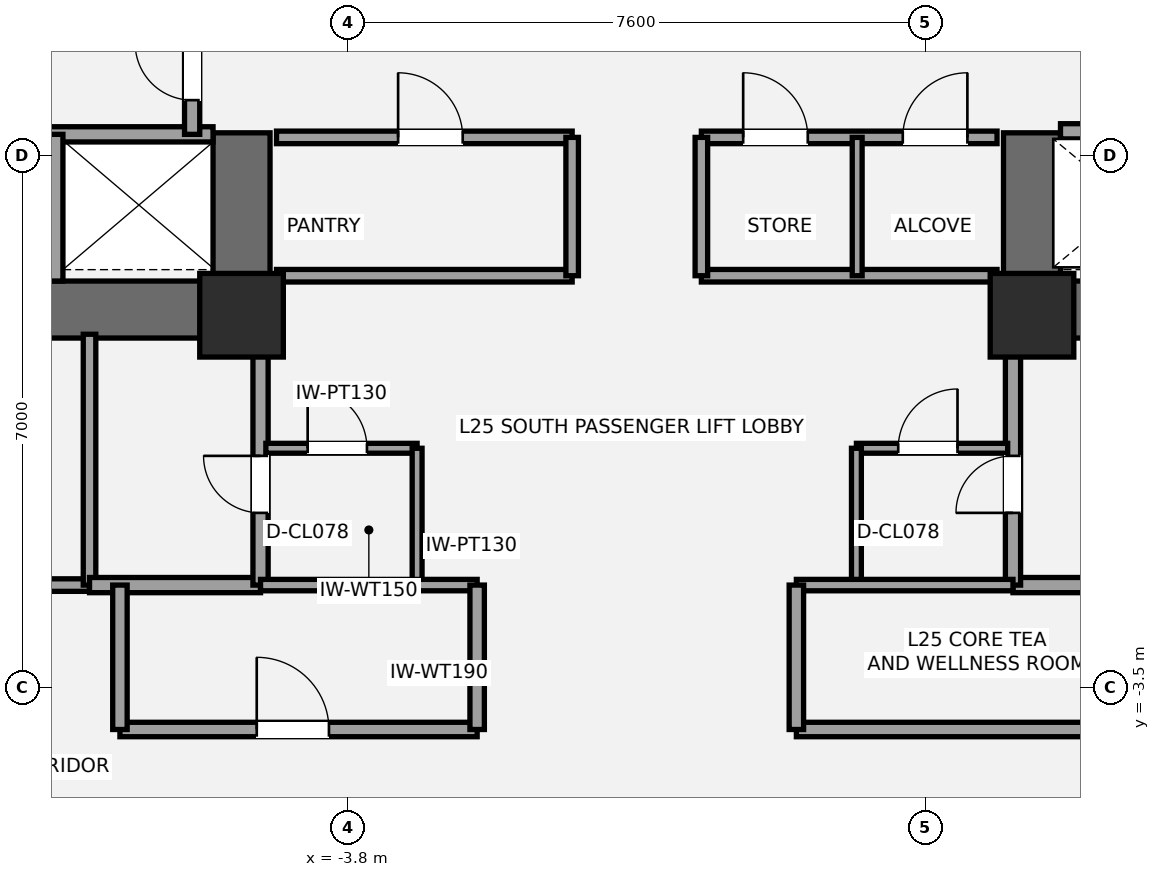
"""IFC4 building model, lengths in metres.
Left out: names, types, materials, properties, quantities, classifications, styles, units other than length and angle.
Written with IfcOpenShell. Run it as: python <this file> out.ifc"""

import sys

from ifc_helpers import new_model, si_unit, direction, frame, frame_2d, origin, origin_2d, place, context, subcontext, project, spatial, rectangle, extrude, element, fill, save


model = new_model("IFC4")
c1 = context("Model", 3, precision=1e-05, world=origin(), true_north=direction((0.0, 1.0)))
c2 = subcontext(c1, "Body", "Model", "MODEL_VIEW")
j1 = project(units=[si_unit("LENGTHUNIT", "METRE"), si_unit("PLANEANGLEUNIT", "RADIAN")], contexts=[c1])
p1 = place(None, origin())
s1 = spatial("IfcSite", under=j1, at=p1, CompositionType="ELEMENT")
p2 = place(p1, origin())
s2 = spatial("IfcBuilding", under=s1, at=p2, CompositionType="ELEMENT")
p3 = place(p2, frame((0.0, 0.0, 96.6)))
s3 = spatial("IfcBuildingStorey", under=s2, at=p3, CompositionType="ELEMENT", Elevation=96.6)
p4 = place(p3, frame((-4.825, 1.475, 0.0), z_axis=(0.0, 0.0, 1.0), x_axis=(-1.0, 0.0, 0.0)))
e1 = element("IfcWall", 1, at=p4, inside=s3, PredefinedType="SHEAR", context=c2, shape_type="SweptSolid", body=[
    extrude(rectangle(XDim=9.075, YDim=0.75, at=frame_2d((4.538, 0.0))), origin(), (0.0, 0.0, 1.0), 3.5),
])
p5 = place(p4, frame((5.475, 0.0, 0.0)))
e2 = element("IfcOpeningElement", 2, at=p5, cuts=e1, PredefinedType="OPENING", context=c2, shape_type="SweptSolid", body=[
    extrude(rectangle(XDim=1.05, YDim=2.15, at=frame_2d((0.525, 1.075))), frame((0.0, 0.385, 0.0), z_axis=(0.0, -1.0, 0.0), x_axis=(1.0, 0.0, 0.0)), (0.0, 0.0, 1.0), 0.77),
])
p6 = place(p4, frame((3.805, 0.0, 0.0)))
e3 = element("IfcOpeningElement", 3, at=p6, cuts=e1, PredefinedType="OPENING", context=c2, shape_type="SweptSolid", body=[
    extrude(rectangle(XDim=1.1, YDim=2.2, at=frame_2d((0.55, 1.1))), frame((0.0, 0.385, 0.0), z_axis=(0.0, -1.0, 0.0), x_axis=(1.0, 0.0, 0.0)), (0.0, 0.0, 1.0), 0.77),
])
p7 = place(p3, frame((-5.2, 1.1, 0.0), z_axis=(0.0, 0.0, 1.0), x_axis=(0.0, 1.0, 0.0)))
e4 = element("IfcWall", 4, at=p7, inside=s3, PredefinedType="SHEAR", context=c2, shape_type="SweptSolid", body=[
    extrude(rectangle(XDim=2.7, YDim=0.75, at=frame_2d((1.35, 0.0))), origin(), (0.0, 0.0, 1.0), 3.5),
])
p8 = place(p3, frame((13.9, 1.475, 0.0), z_axis=(0.0, 0.0, 1.0), x_axis=(-1.0, 0.0, 0.0)))
e5 = element("IfcWall", 5, at=p8, inside=s3, PredefinedType="SHEAR", context=c2, shape_type="SweptSolid", body=[
    extrude(rectangle(XDim=9.075, YDim=0.75, at=frame_2d((4.538, 0.0))), origin(), (0.0, 0.0, 1.0), 3.5),
])
p9 = place(p8, frame((2.55, 0.0, 0.0)))
e6 = element("IfcOpeningElement", 6, at=p9, cuts=e5, PredefinedType="OPENING", context=c2, shape_type="SweptSolid", body=[
    extrude(rectangle(XDim=1.05, YDim=2.15, at=frame_2d((0.525, 1.075))), frame((0.0, 0.385, 0.0), z_axis=(0.0, -1.0, 0.0), x_axis=(1.0, 0.0, 0.0)), (0.0, 0.0, 1.0), 0.77),
])
p10 = place(p8, frame((4.55, 0.0, 0.0)))
e7 = element("IfcOpeningElement", 7, at=p10, cuts=e5, PredefinedType="OPENING", context=c2, shape_type="SweptSolid", body=[
    extrude(rectangle(XDim=1.1, YDim=2.2, at=frame_2d((0.55, 1.1))), frame((0.0, 0.385, 0.0), z_axis=(0.0, -1.0, 0.0), x_axis=(1.0, 0.0, 0.0)), (0.0, 0.0, 1.0), 0.77),
])
p11 = place(p3, frame((5.2, 1.1, 0.0), z_axis=(0.0, 0.0, 1.0), x_axis=(0.0, 1.0, 0.0)))
e8 = element("IfcWall", 8, at=p11, inside=s3, PredefinedType="SHEAR", context=c2, shape_type="SweptSolid", body=[
    extrude(rectangle(XDim=2.7, YDim=0.75, at=frame_2d((1.35, 0.0))), origin(), (0.0, 0.0, 1.0), 3.5),
])
for number, where, z_axis, x_axis in (
    (9, (-5.2, 1.4, 0.0), (0.0, 0.0, 1.0), (1.0, 0.0, 0.0)),
    (10, (5.2, 1.4, 0.0), (0.0, 0.0, 1.0), (1.0, 0.0, 0.0)),
):
    element("IfcColumn", number, at=place(p3, frame(where, z_axis=z_axis, x_axis=x_axis)), inside=s3, PredefinedType="COLUMN", context=c2, shape_type="SweptSolid", body=[
        extrude(rectangle(XDim=1.1, YDim=1.1, at=origin_2d()), origin(), (0.0, 0.0, 1.0), 3.5),
    ])
p12 = place(p3, frame((-13.45, -2.15, 0.0), z_axis=(0.0, 0.0, 1.0), x_axis=(1.0, 0.0, 0.0)))
e11 = element("IfcWall", 11, at=p12, inside=s3, PredefinedType="PARTITIONING", context=c2, shape_type="SweptSolid", body=[
    extrude(rectangle(XDim=6.25, YDim=0.165, at=frame_2d((3.125, 0.0))), origin(), (0.0, 0.0, 1.0), 2.763),
])
p13 = place(p3, frame((-7.2, -2.15, 0.0), z_axis=(0.0, 0.0, 1.0), x_axis=(0.0, 1.0, 0.0)))
e12 = element("IfcWall", 12, at=p13, inside=s3, PredefinedType="PARTITIONING", context=c2, shape_type="SweptSolid", body=[
    extrude(rectangle(XDim=3.3, YDim=0.165, at=frame_2d((1.65, 0.0))), origin(), (0.0, 0.0, 1.0), 2.763),
])
p14 = place(p3, frame((-7.2, -2.15, 0.0), z_axis=(0.0, 0.0, 1.0), x_axis=(1.0, 0.0, 0.0)))
e13 = element("IfcWall", 13, at=p14, inside=s3, PredefinedType="SOLIDWALL", context=c2, shape_type="SweptSolid", body=[
    extrude(rectangle(XDim=2.25, YDim=0.2, at=frame_2d((1.125, 0.0))), origin(), (0.0, 0.0, 1.0), 2.763),
])
p15 = place(p3, frame((-4.95, -2.15, 0.0), z_axis=(0.0, 0.0, 1.0), x_axis=(0.0, 1.0, 0.0)))
e14 = element("IfcWall", 14, at=p15, inside=s3, PredefinedType="SOLIDWALL", context=c2, shape_type="SweptSolid", body=[
    extrude(rectangle(XDim=3.3, YDim=0.2, at=frame_2d((1.65, 0.0))), origin(), (0.0, 0.0, 1.0), 2.763),
])
p16 = place(p15, frame((0.95, 0.0, 0.0)))
e15 = element("IfcOpeningElement", 15, at=p16, cuts=e14, PredefinedType="OPENING", context=c2, shape_type="SweptSolid", body=[
    extrude(rectangle(XDim=0.75, YDim=2.1, at=frame_2d((0.375, 1.05))), frame((0.0, 0.11, 0.0), z_axis=(0.0, -1.0, 0.0), x_axis=(1.0, 0.0, 0.0)), (0.0, 0.0, 1.0), 0.22),
])
p17 = place(p3, frame((4.95, -2.15, 0.0), z_axis=(0.0, 0.0, 1.0), x_axis=(1.0, 0.0, 0.0)))
e16 = element("IfcWall", 16, at=p17, inside=s3, PredefinedType="SOLIDWALL", context=c2, shape_type="SweptSolid", body=[
    extrude(rectangle(XDim=2.25, YDim=0.2, at=frame_2d((1.125, 0.0))), origin(), (0.0, 0.0, 1.0), 2.763),
])
p18 = place(p3, frame((4.95, -2.15, 0.0), z_axis=(0.0, 0.0, 1.0), x_axis=(0.0, 1.0, 0.0)))
e17 = element("IfcWall", 17, at=p18, inside=s3, PredefinedType="SOLIDWALL", context=c2, shape_type="SweptSolid", body=[
    extrude(rectangle(XDim=3.3, YDim=0.2, at=frame_2d((1.65, 0.0))), origin(), (0.0, 0.0, 1.0), 3.31),
])
p19 = place(p18, frame((0.95, 0.0, 0.0)))
e18 = element("IfcOpeningElement", 18, at=p19, cuts=e17, PredefinedType="OPENING", context=c2, shape_type="SweptSolid", body=[
    extrude(rectangle(XDim=0.75, YDim=2.1, at=frame_2d((0.375, 1.05))), frame((0.0, 0.11, 0.0), z_axis=(0.0, -1.0, 0.0), x_axis=(1.0, 0.0, 0.0)), (0.0, 0.0, 1.0), 0.22),
])
p20 = place(p3, frame((-4.88, -0.35, 0.0), z_axis=(0.0, 0.0, 1.0), x_axis=(1.0, 0.0, 0.0)))
e19 = element("IfcWall", 19, at=p20, inside=s3, PredefinedType="PARTITIONING", context=c2, shape_type="SweptSolid", body=[
    extrude(rectangle(XDim=1.99, YDim=0.13, at=frame_2d((0.995, 0.0))), origin(), (0.0, 0.0, 1.0), 2.763),
])
p21 = place(p20, frame((0.55, 0.0, 0.0)))
e20 = element("IfcOpeningElement", 20, at=p21, cuts=e19, PredefinedType="OPENING", context=c2, shape_type="SweptSolid", body=[
    extrude(rectangle(XDim=0.78, YDim=2.1, at=frame_2d((0.39, 1.05))), frame((0.0, 0.075, 0.0), z_axis=(0.0, -1.0, 0.0), x_axis=(1.0, 0.0, 0.0)), (0.0, 0.0, 1.0), 0.15),
])
p22 = place(p3, frame((-2.89, -2.15, 0.0), z_axis=(0.0, 0.0, 1.0), x_axis=(0.0, 1.0, 0.0)))
e21 = element("IfcWall", 21, at=p22, inside=s3, PredefinedType="PARTITIONING", context=c2, shape_type="SweptSolid", body=[
    extrude(rectangle(XDim=1.8, YDim=0.13, at=frame_2d((0.9, 0.0))), origin(), (0.0, 0.0, 1.0), 3.31),
])
p23 = place(p3, frame((2.89, -0.35, 0.0), z_axis=(0.0, 0.0, 1.0), x_axis=(1.0, 0.0, 0.0)))
e22 = element("IfcWall", 22, at=p23, inside=s3, PredefinedType="PARTITIONING", context=c2, shape_type="SweptSolid", body=[
    extrude(rectangle(XDim=1.99, YDim=0.13, at=frame_2d((0.995, 0.0))), origin(), (0.0, 0.0, 1.0), 3.31),
])
p24 = place(p23, frame((0.55, 0.0, 0.0)))
e23 = element("IfcOpeningElement", 23, at=p24, cuts=e22, PredefinedType="OPENING", context=c2, shape_type="SweptSolid", body=[
    extrude(rectangle(XDim=0.78, YDim=2.1, at=frame_2d((0.39, 1.05))), frame((0.0, 0.075, 0.0), z_axis=(0.0, -1.0, 0.0), x_axis=(1.0, 0.0, 0.0)), (0.0, 0.0, 1.0), 0.15),
])
p25 = place(p3, frame((2.89, -2.15, 0.0), z_axis=(0.0, 0.0, 1.0), x_axis=(0.0, 1.0, 0.0)))
e24 = element("IfcWall", 24, at=p25, inside=s3, PredefinedType="PARTITIONING", context=c2, shape_type="SweptSolid", body=[
    extrude(rectangle(XDim=1.8, YDim=0.13, at=frame_2d((0.9, 0.0))), origin(), (0.0, 0.0, 1.0), 3.31),
])
p26 = place(p3, frame((-9.78, 3.78, 0.0), z_axis=(0.0, 0.0, 1.0), x_axis=(1.0, 0.0, 0.0)))
e25 = element("IfcWall", 25, at=p26, inside=s3, PredefinedType="SOLIDWALL", context=c2, shape_type="SweptSolid", body=[
    extrude(rectangle(XDim=4.205, YDim=0.2, at=frame_2d((2.103, 0.0))), origin(), (0.0, 0.0, 1.0), 3.31),
])
p27 = place(p3, frame((-7.65, 1.85, 0.0), z_axis=(0.0, 0.0, 1.0), x_axis=(0.0, 1.0, 0.0)))
e26 = element("IfcWall", 26, at=p27, inside=s3, PredefinedType="SOLIDWALL", context=c2, shape_type="SweptSolid", body=[
    extrude(rectangle(XDim=1.93, YDim=0.2, at=frame_2d((0.965, 0.0))), origin(), (0.0, 0.0, 1.0), 3.31),
])
p28 = place(p3, frame((-5.85, 3.78, 0.0), z_axis=(0.0, 0.0, 1.0), x_axis=(0.0, 1.0, 0.0)))
e27 = element("IfcWall", 27, at=p28, inside=s3, PredefinedType="SOLIDWALL", context=c2, shape_type="SweptSolid", body=[
    extrude(rectangle(XDim=1.69, YDim=0.2, at=frame_2d((0.845, 0.0))), origin(), (0.0, 0.0, 1.0), 3.31),
])
p29 = place(p28, frame((0.45, 0.0, 0.0)))
e28 = element("IfcOpeningElement", 28, at=p29, cuts=e27, PredefinedType="OPENING", context=c2, shape_type="SweptSolid", body=[
    extrude(rectangle(XDim=0.75, YDim=2.1, at=frame_2d((0.375, 1.05))), frame((0.0, 0.11, 0.0), z_axis=(0.0, -1.0, 0.0), x_axis=(1.0, 0.0, 0.0)), (0.0, 0.0, 1.0), 0.22),
])
p30 = place(p3, frame((5.575, 3.82, 0.0), z_axis=(0.0, 0.0, 1.0), x_axis=(1.0, 0.0, 0.0)))
e29 = element("IfcWall", 29, at=p30, inside=s3, PredefinedType="SOLIDWALL", context=c2, shape_type="SweptSolid", body=[
    extrude(rectangle(XDim=4.205, YDim=0.2, at=frame_2d((2.103, 0.0))), origin(), (0.0, 0.0, 1.0), 3.31),
])
p31 = place(p30, frame((0.65, 0.0, 0.0)))
e30 = element("IfcOpeningElement", 30, at=p31, cuts=e29, PredefinedType="OPENING", context=c2, shape_type="SweptSolid", body=[
    extrude(rectangle(XDim=1.2, YDim=2.2, at=frame_2d((0.6, 1.1))), frame((0.0, 0.11, 0.0), z_axis=(0.0, -1.0, 0.0), x_axis=(1.0, 0.0, 0.0)), (0.0, 0.0, 1.0), 0.22),
])
p32 = place(p3, frame((-4.74, 1.92, 0.0), z_axis=(0.0, 0.0, 1.0), x_axis=(1.0, 0.0, 0.0)))
e31 = element("IfcWall", 31, at=p32, inside=s3, PredefinedType="PARTITIONING", context=c2, shape_type="SweptSolid", body=[
    extrude(rectangle(XDim=3.89, YDim=0.165, at=frame_2d((1.945, 0.0))), origin(), (0.0, 0.0, 1.0), 2.3),
])
p33 = place(p3, frame((-4.74, 3.74, 0.0), z_axis=(0.0, 0.0, 1.0), x_axis=(1.0, 0.0, 0.0)))
e32 = element("IfcWall", 32, at=p33, inside=s3, PredefinedType="PARTITIONING", context=c2, shape_type="SweptSolid", body=[
    extrude(rectangle(XDim=3.89, YDim=0.165, at=frame_2d((1.945, 0.0))), origin(), (0.0, 0.0, 1.0), 3.31),
])
p34 = place(p33, frame((1.6, 0.0, 0.0)))
e33 = element("IfcOpeningElement", 33, at=p34, cuts=e32, PredefinedType="OPENING", context=c2, shape_type="SweptSolid", body=[
    extrude(rectangle(XDim=0.85, YDim=2.1, at=frame_2d((0.425, 1.05))), frame((0.0, 0.093, 0.0), z_axis=(0.0, -1.0, 0.0), x_axis=(1.0, 0.0, 0.0)), (0.0, 0.0, 1.0), 0.185),
])
p35 = place(p3, frame((-0.85, 1.92, 0.0), z_axis=(0.0, 0.0, 1.0), x_axis=(0.0, 1.0, 0.0)))
e34 = element("IfcWall", 34, at=p35, inside=s3, PredefinedType="PARTITIONING", context=c2, shape_type="SweptSolid", body=[
    extrude(rectangle(XDim=1.82, YDim=0.165, at=frame_2d((0.91, 0.0))), origin(), (0.0, 0.0, 1.0), 3.31),
])
p36 = place(p3, frame((0.85, 1.92, 0.0), z_axis=(0.0, 0.0, 1.0), x_axis=(1.0, 0.0, 0.0)))
e35 = element("IfcWall", 35, at=p36, inside=s3, PredefinedType="PARTITIONING", context=c2, shape_type="SweptSolid", body=[
    extrude(rectangle(XDim=3.89, YDim=0.165, at=frame_2d((1.945, 0.0))), origin(), (0.0, 0.0, 1.0), 2.3),
])
p37 = place(p3, frame((0.85, 3.74, 0.0), z_axis=(0.0, 0.0, 1.0), x_axis=(1.0, 0.0, 0.0)))
e36 = element("IfcWall", 36, at=p37, inside=s3, PredefinedType="PARTITIONING", context=c2, shape_type="SweptSolid", body=[
    extrude(rectangle(XDim=3.89, YDim=0.165, at=frame_2d((1.945, 0.0))), origin(), (0.0, 0.0, 1.0), 3.31),
])
p38 = place(p37, frame((0.55, 0.0, 0.0)))
e37 = element("IfcOpeningElement", 37, at=p38, cuts=e36, PredefinedType="OPENING", context=c2, shape_type="SweptSolid", body=[
    extrude(rectangle(XDim=0.85, YDim=2.1, at=frame_2d((0.425, 1.05))), frame((0.0, 0.093, 0.0), z_axis=(0.0, -1.0, 0.0), x_axis=(1.0, 0.0, 0.0)), (0.0, 0.0, 1.0), 0.185),
])
p39 = place(p37, frame((2.65, 0.0, 0.0)))
e38 = element("IfcOpeningElement", 38, at=p39, cuts=e36, PredefinedType="OPENING", context=c2, shape_type="SweptSolid", body=[
    extrude(rectangle(XDim=0.85, YDim=2.1, at=frame_2d((0.425, 1.05))), frame((0.0, 0.093, 0.0), z_axis=(0.0, -1.0, 0.0), x_axis=(1.0, 0.0, 0.0)), (0.0, 0.0, 1.0), 0.185),
])
p40 = place(p3, frame((0.85, 1.92, 0.0), z_axis=(0.0, 0.0, 1.0), x_axis=(0.0, 1.0, 0.0)))
e39 = element("IfcWall", 39, at=p40, inside=s3, PredefinedType="PARTITIONING", context=c2, shape_type="SweptSolid", body=[
    extrude(rectangle(XDim=1.82, YDim=0.165, at=frame_2d((0.91, 0.0))), origin(), (0.0, 0.0, 1.0), 3.31),
])
p41 = place(p3, frame((2.9, 1.92, 0.0), z_axis=(0.0, 0.0, 1.0), x_axis=(0.0, 1.0, 0.0)))
e40 = element("IfcWall", 40, at=p41, inside=s3, PredefinedType="PARTITIONING", context=c2, shape_type="SweptSolid", body=[
    extrude(rectangle(XDim=1.82, YDim=0.13, at=frame_2d((0.91, 0.0))), origin(), (0.0, 0.0, 1.0), 3.31),
])
p42 = place(p3, frame((-6.8, -4.05, 0.0), z_axis=(0.0, 0.0, 1.0), x_axis=(1.0, 0.0, 0.0)))
e41 = element("IfcWall", 41, at=p42, inside=s3, PredefinedType="PLUMBINGWALL", context=c2, shape_type="SweptSolid", body=[
    extrude(rectangle(XDim=4.7, YDim=0.19, at=frame_2d((2.35, 0.0))), origin(), (0.0, 0.0, 1.0), 2.763),
])
p43 = place(p42, frame((1.8, 0.0, 0.0)))
e42 = element("IfcOpeningElement", 42, at=p43, cuts=e41, PredefinedType="OPENING", context=c2, shape_type="SweptSolid", body=[
    extrude(rectangle(XDim=0.95, YDim=2.15, at=frame_2d((0.475, 1.075))), frame((0.0, 0.105, 0.0), z_axis=(0.0, -1.0, 0.0), x_axis=(1.0, 0.0, 0.0)), (0.0, 0.0, 1.0), 0.21),
])
p44 = place(p3, frame((-4.95, -2.15, 0.0), z_axis=(0.0, 0.0, 1.0), x_axis=(1.0, 0.0, 0.0)))
e43 = element("IfcWall", 43, at=p44, inside=s3, PredefinedType="PLUMBINGWALL", context=c2, shape_type="SweptSolid", body=[
    extrude(rectangle(XDim=2.85, YDim=0.15, at=frame_2d((1.425, 0.0))), origin(), (0.0, 0.0, 1.0), 2.763),
])
p45 = place(p3, frame((-6.8, -4.05, 0.0), z_axis=(0.0, 0.0, 1.0), x_axis=(0.0, 1.0, 0.0)))
e44 = element("IfcWall", 44, at=p45, inside=s3, PredefinedType="PLUMBINGWALL", context=c2, shape_type="SweptSolid", body=[
    extrude(rectangle(XDim=1.9, YDim=0.19, at=frame_2d((0.95, 0.0))), origin(), (0.0, 0.0, 1.0), 2.763),
])
p46 = place(p3, frame((-2.1, -4.05, 0.0), z_axis=(0.0, 0.0, 1.0), x_axis=(0.0, 1.0, 0.0)))
e45 = element("IfcWall", 45, at=p46, inside=s3, PredefinedType="PLUMBINGWALL", context=c2, shape_type="SweptSolid", body=[
    extrude(rectangle(XDim=1.9, YDim=0.19, at=frame_2d((0.95, 0.0))), origin(), (0.0, 0.0, 1.0), 3.31),
])
p47 = place(p3, frame((2.1, -4.05, 0.0), z_axis=(0.0, 0.0, 1.0), x_axis=(1.0, 0.0, 0.0)))
e46 = element("IfcWall", 46, at=p47, inside=s3, PredefinedType="PLUMBINGWALL", context=c2, shape_type="SweptSolid", body=[
    extrude(rectangle(XDim=11.35, YDim=0.19, at=frame_2d((5.675, 0.0))), origin(), (0.0, 0.0, 1.0), 2.763),
])
p48 = place(p47, frame((5.2, 0.0, 0.0)))
e47 = element("IfcOpeningElement", 47, at=p48, cuts=e46, PredefinedType="OPENING", context=c2, shape_type="SweptSolid", body=[
    extrude(rectangle(XDim=0.9, YDim=2.1, at=frame_2d((0.45, 1.05))), frame((0.0, 0.105, 0.0), z_axis=(0.0, -1.0, 0.0), x_axis=(1.0, 0.0, 0.0)), (0.0, 0.0, 1.0), 0.21),
])
p49 = place(p3, frame((2.1, -2.15, 0.0), z_axis=(0.0, 0.0, 1.0), x_axis=(1.0, 0.0, 0.0)))
e48 = element("IfcWall", 48, at=p49, inside=s3, PredefinedType="PLUMBINGWALL", context=c2, shape_type="SweptSolid", body=[
    extrude(rectangle(XDim=2.85, YDim=0.15, at=frame_2d((1.425, 0.0))), origin(), (0.0, 0.0, 1.0), 2.763),
])
p50 = place(p3, frame((2.1, -4.05, 0.0), z_axis=(0.0, 0.0, 1.0), x_axis=(0.0, 1.0, 0.0)))
e49 = element("IfcWall", 49, at=p50, inside=s3, PredefinedType="PLUMBINGWALL", context=c2, shape_type="SweptSolid", body=[
    extrude(rectangle(XDim=1.9, YDim=0.19, at=frame_2d((0.95, 0.0))), origin(), (0.0, 0.0, 1.0), 3.31),
])
p51 = place(p16, origin())
e50 = element("IfcDoor", 50, at=p51, inside=s3, OperationType="SINGLE_SWING_RIGHT", PredefinedType="DOOR", context=c2, shape_type="SweptSolid", body=[
    extrude(rectangle(XDim=0.75, YDim=2.1, at=frame_2d((0.375, 1.05))), frame((0.0, 0.025, 0.0), z_axis=(0.0, -1.0, 0.0), x_axis=(1.0, 0.0, 0.0)), (0.0, 0.0, 1.0), 0.05),
])
fill(e15, e50)
p52 = place(p19, origin())
e51 = element("IfcDoor", 51, at=p52, inside=s3, OperationType="SINGLE_SWING_LEFT", PredefinedType="DOOR", context=c2, shape_type="SweptSolid", body=[
    extrude(rectangle(XDim=0.75, YDim=2.1, at=frame_2d((0.375, 1.05))), frame((0.0, 0.025, 0.0), z_axis=(0.0, -1.0, 0.0), x_axis=(1.0, 0.0, 0.0)), (0.0, 0.0, 1.0), 0.05),
])
fill(e18, e51)
p53 = place(p21, origin())
e52 = element("IfcDoor", 52, at=p53, inside=s3, OperationType="SINGLE_SWING_LEFT", PredefinedType="DOOR", context=c2, shape_type="SweptSolid", body=[
    extrude(rectangle(XDim=0.78, YDim=2.1, at=frame_2d((0.39, 1.05))), frame((0.0, 0.025, 0.0), z_axis=(0.0, -1.0, 0.0), x_axis=(1.0, 0.0, 0.0)), (0.0, 0.0, 1.0), 0.05),
])
fill(e20, e52)
p54 = place(p24, origin())
e53 = element("IfcDoor", 53, at=p54, inside=s3, OperationType="SINGLE_SWING_RIGHT", PredefinedType="DOOR", context=c2, shape_type="SweptSolid", body=[
    extrude(rectangle(XDim=0.78, YDim=2.1, at=frame_2d((0.39, 1.05))), frame((0.0, 0.025, 0.0), z_axis=(0.0, -1.0, 0.0), x_axis=(1.0, 0.0, 0.0)), (0.0, 0.0, 1.0), 0.05),
])
fill(e23, e53)
p55 = place(p29, origin())
e54 = element("IfcDoor", 54, at=p55, inside=s3, OperationType="SINGLE_SWING_RIGHT", PredefinedType="DOOR", context=c2, shape_type="SweptSolid", body=[
    extrude(rectangle(XDim=0.75, YDim=2.1, at=frame_2d((0.375, 1.05))), frame((0.0, 0.025, 0.0), z_axis=(0.0, -1.0, 0.0), x_axis=(1.0, 0.0, 0.0)), (0.0, 0.0, 1.0), 0.05),
])
fill(e28, e54)
p56 = place(p34, origin())
e55 = element("IfcDoor", 55, at=p56, inside=s3, OperationType="SINGLE_SWING_LEFT", PredefinedType="DOOR", context=c2, shape_type="SweptSolid", body=[
    extrude(rectangle(XDim=0.85, YDim=2.1, at=frame_2d((0.425, 1.05))), frame((0.0, 0.025, 0.0), z_axis=(0.0, -1.0, 0.0), x_axis=(1.0, 0.0, 0.0)), (0.0, 0.0, 1.0), 0.05),
])
fill(e33, e55)
p57 = place(p38, origin())
e56 = element("IfcDoor", 56, at=p57, inside=s3, OperationType="SINGLE_SWING_LEFT", PredefinedType="DOOR", context=c2, shape_type="SweptSolid", body=[
    extrude(rectangle(XDim=0.85, YDim=2.1, at=frame_2d((0.425, 1.05))), frame((0.0, 0.025, 0.0), z_axis=(0.0, -1.0, 0.0), x_axis=(1.0, 0.0, 0.0)), (0.0, 0.0, 1.0), 0.05),
])
fill(e37, e56)
p58 = place(p39, origin())
e57 = element("IfcDoor", 57, at=p58, inside=s3, OperationType="SINGLE_SWING_RIGHT", PredefinedType="DOOR", context=c2, shape_type="SweptSolid", body=[
    extrude(rectangle(XDim=0.85, YDim=2.1, at=frame_2d((0.425, 1.05))), frame((0.0, 0.025, 0.0), z_axis=(0.0, -1.0, 0.0), x_axis=(1.0, 0.0, 0.0)), (0.0, 0.0, 1.0), 0.05),
])
fill(e38, e57)
p59 = place(p43, origin())
e58 = element("IfcDoor", 58, at=p59, inside=s3, OperationType="SINGLE_SWING_LEFT", PredefinedType="DOOR", context=c2, shape_type="SweptSolid", body=[
    extrude(rectangle(XDim=0.95, YDim=2.15, at=frame_2d((0.475, 1.075))), frame((0.0, 0.025, 0.0), z_axis=(0.0, -1.0, 0.0), x_axis=(1.0, 0.0, 0.0)), (0.0, 0.0, 1.0), 0.05),
])
fill(e42, e58)
save(model, sys.argv[1])
